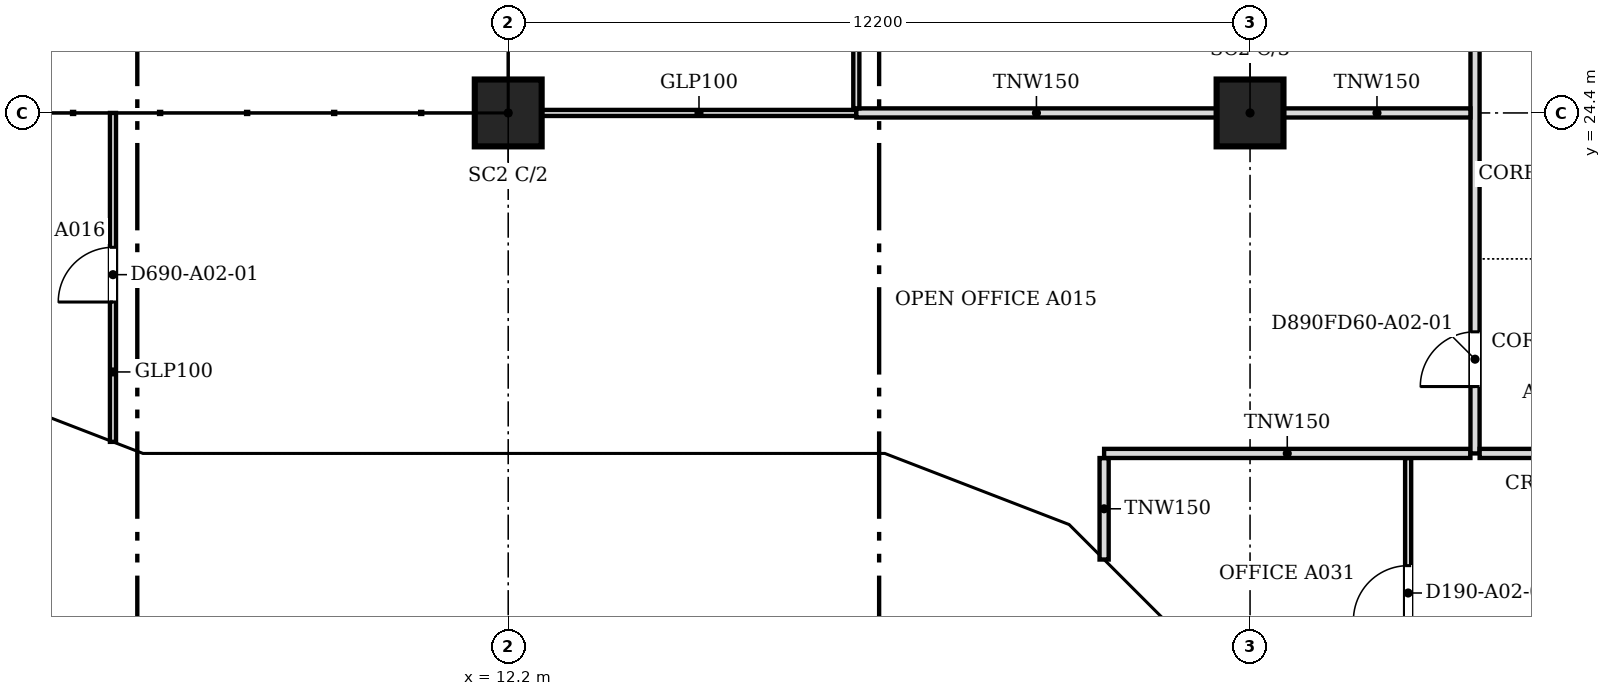
"""IFC4 building model, lengths in metres.
Left out: names, types, materials, properties, quantities, classifications, styles, units other than length and angle.
Written with IfcOpenShell. Run it as: python <this file> out.ifc"""

import sys

from ifc_helpers import new_model, si_unit, direction, frame, frame_2d, origin, origin_2d, place, context, subcontext, project, spatial, polyline, rectangle, outline, extrude, faceted_brep, source, transform, mapped, element, fill, save


model = new_model("IFC4")
c1 = context("Model", 3, precision=1e-05, world=origin(), true_north=direction((0.0, 1.0)))
c2 = subcontext(c1, "Body", "Model", "MODEL_VIEW")
j1 = project(units=[si_unit("LENGTHUNIT", "METRE"), si_unit("PLANEANGLEUNIT", "RADIAN")], contexts=[c1])
p1 = place(None, origin())
s1 = spatial("IfcSite", under=j1, at=p1, CompositionType="ELEMENT")
p2 = place(p1, origin())
s2 = spatial("IfcBuilding", under=s1, at=p2, CompositionType="ELEMENT")
p3 = place(p2, frame((0.0, 0.0, 33.4)))
s3 = spatial("IfcBuildingStorey", under=s2, at=p3, CompositionType="ELEMENT", Elevation=33.4)
for number, where, z_axis, x_axis in (
    (1, (12.2, 24.4, 0.0), (0.0, 0.0, 1.0), (1.0, 0.0, 0.0)),
    (2, (24.4, 24.4, 0.0), (0.0, 0.0, 1.0), (1.0, 0.0, 0.0)),
):
    element("IfcColumn", number, at=place(p3, frame(where, z_axis=z_axis, x_axis=x_axis)), inside=s3, PredefinedType="COLUMN", context=c2, shape_type="SweptSolid", body=[
        extrude(rectangle(XDim=1.1, YDim=1.1, at=origin_2d()), origin(), (0.0, 0.0, 1.0), 3.6),
    ])
m1 = source(origin(), c2, "Body", "Brep", [
    faceted_brep([(2.95, -0.25, 0.0), (2.997, -0.25, 0.059), (2.997, -0.25, 7.541), (2.95, -0.25, 7.6), (0.0, -0.25, 3.8), (0.053, 0.25, 3.868), (2.904, 0.25, 7.54), (2.904, 0.25, 0.06), (0.053, 0.25, 3.732), (2.95, 0.0, 0.0), (2.95, 0.0, 7.6), (0.0, 0.0, 3.8)], [[[0, 1, 2, 3, 4]], [[5, 6, 7, 8]], [[1, 0, 9]], [[10, 3, 2]], [[6, 5, 11, 4, 3, 10]], [[8, 7, 9, 0, 4, 11]], [[8, 11, 5]], [[1, 9, 7, 6, 10, 2]]]),
])
p4 = place(p3, frame((3.394, 19.612, -3.8), z_axis=(0.0, 0.0, 1.0), x_axis=(0.932990326376, -0.359901446078, 0.0)))
e3 = element("IfcWall", 3, at=p4, inside=s3, PredefinedType="SOLIDWALL", context=c2, shape_type="MappedRepresentation", body=[
    mapped(m1, transform((0.0, 0.0, 0.0), scale=1.0)),
])
m2 = source(origin(), c2, "Body", "SweptSolid", [
    extrude(outline(polyline([(2.75, 6.935), (0.316, 3.8), (2.75, 0.665), (2.75, 6.935)])), frame((0.0, 0.26, 0.0), z_axis=(0.0, -1.0, 0.0), x_axis=(1.0, 0.0, 0.0)), (0.0, 0.0, 1.0), 0.52),
])
p5 = place(p4, origin())
e4 = element("IfcOpeningElement", 4, at=p5, cuts=e3, PredefinedType="OPENING", context=c2, shape_type="MappedRepresentation", body=[
    mapped(m2, transform((0.0, 0.0, 0.0), scale=1.0)),
])
m3 = source(origin(), c2, "Body", "Brep", [
    faceted_brep([(0.047, -0.25, 0.0), (3.05, -0.25, 3.8), (0.047, -0.25, 7.6), (0.0, -0.25, 7.54), (0.0, -0.25, 0.06), (0.093, 0.25, 7.541), (3.05, 0.25, 3.8), (0.093, 0.25, 0.059), (0.047, 0.0, 0.0), (0.047, 0.0, 7.6)], [[[0, 1, 2, 3, 4]], [[5, 6, 7]], [[7, 6, 1, 0, 8]], [[6, 5, 9, 2, 1]], [[3, 2, 9]], [[8, 0, 4]], [[7, 8, 4, 3, 9, 5]]]),
])
p6 = place(p3, frame((6.1, 18.55, -3.8), z_axis=(0.0, 0.0, 1.0), x_axis=(1.0, 0.0, 0.0)))
e5 = element("IfcWall", 5, at=p6, inside=s3, PredefinedType="SOLIDWALL", context=c2, shape_type="MappedRepresentation", body=[
    mapped(m3, transform((0.0, 0.0, 0.0), scale=1.0)),
])
m4 = source(origin(), c2, "Body", "SweptSolid", [
    extrude(outline(polyline([(0.247, 0.656), (2.731, 3.8), (0.247, 6.944), (0.247, 0.656)])), frame((0.0, 0.26, 0.0), z_axis=(0.0, -1.0, 0.0), x_axis=(1.0, 0.0, 0.0)), (0.0, 0.0, 1.0), 0.52),
])
p7 = place(p6, origin())
e6 = element("IfcOpeningElement", 6, at=p7, cuts=e5, PredefinedType="OPENING", context=c2, shape_type="MappedRepresentation", body=[
    mapped(m4, transform((0.0, 0.0, 0.0), scale=1.0)),
])
m5 = source(origin(), c2, "Body", "SweptSolid", [
    extrude(outline(polyline([(3.05, 0.0), (6.1, 3.8), (3.05, 7.6), (0.0, 3.8), (3.05, 0.0)])), frame((0.0, 0.25, 0.0), z_axis=(0.0, -1.0, 0.0), x_axis=(1.0, 0.0, 0.0)), (0.0, 0.0, 1.0), 0.5),
])
p8 = place(p3, frame((9.15, 18.55, -3.8), z_axis=(0.0, 0.0, 1.0), x_axis=(1.0, 0.0, 0.0)))
e7 = element("IfcWall", 7, at=p8, inside=s3, PredefinedType="SOLIDWALL", context=c2, shape_type="MappedRepresentation", body=[
    mapped(m5, transform((0.0, 0.0, 0.0), scale=1.0)),
])
m6 = source(origin(), c2, "Body", "SweptSolid", [
    extrude(outline(polyline([(3.05, 0.399), (5.78, 3.8), (3.05, 7.2), (0.321, 3.8), (3.05, 0.399)])), frame((0.0, 0.26, 0.0), z_axis=(0.0, -1.0, 0.0), x_axis=(1.0, 0.0, 0.0)), (0.0, 0.0, 1.0), 0.52),
])
p9 = place(p8, origin())
e8 = element("IfcOpeningElement", 8, at=p9, cuts=e7, PredefinedType="OPENING", context=c2, shape_type="MappedRepresentation", body=[
    mapped(m6, transform((0.0, 0.0, 0.0), scale=1.0)),
])
m7 = source(origin(), c2, "Body", "Brep", [
    faceted_brep([(3.05, -0.25, 7.543), (0.0, -0.25, 3.8), (3.05, -0.25, 0.057), (0.0, 0.25, 3.8), (3.096, 0.25, 7.6), (3.143, 0.25, 7.543), (3.143, 0.25, 0.056), (3.096, 0.25, 0.0), (3.096, -0.0, 0.0), (3.096, -0.0, 7.6)], [[[0, 1, 2]], [[3, 4, 5, 6, 7]], [[7, 6, 8]], [[5, 4, 9]], [[4, 3, 1, 0, 9]], [[3, 7, 8, 2, 1]], [[2, 8, 6, 5, 9, 0]]]),
])
p10 = place(p3, frame((15.25, 18.55, -3.8), z_axis=(0.0, 0.0, 1.0), x_axis=(1.0, 0.0, 0.0)))
e9 = element("IfcWall", 9, at=p10, inside=s3, PredefinedType="SOLIDWALL", context=c2, shape_type="MappedRepresentation", body=[
    mapped(m7, transform((0.0, 0.0, 0.0), scale=1.0)),
])
m8 = source(origin(), c2, "Body", "SweptSolid", [
    extrude(outline(polyline([(2.896, 6.959), (0.323, 3.8), (2.896, 0.641), (2.896, 6.959)])), frame((0.0, 0.26, 0.0), z_axis=(0.0, -1.0, 0.0), x_axis=(1.0, 0.0, 0.0)), (0.0, 0.0, 1.0), 0.52),
])
p11 = place(p10, origin())
e10 = element("IfcOpeningElement", 10, at=p11, cuts=e9, PredefinedType="OPENING", context=c2, shape_type="MappedRepresentation", body=[
    mapped(m8, transform((0.0, 0.0, 0.0), scale=1.0)),
])
m9 = source(origin(), c2, "Body", "Brep", [
    faceted_brep([(0.093, -0.25, 0.056), (3.143, -0.25, 3.736), (3.143, -0.25, 3.864), (0.093, -0.25, 7.544), (0.0, 0.25, 7.543), (0.047, 0.25, 7.6), (3.196, 0.25, 3.8), (0.047, 0.25, 0.0), (0.0, 0.25, 0.057), (3.196, -0.0, 3.8), (0.047, 0.0, 0.0), (0.047, 0.0, 7.6)], [[[0, 1, 2, 3]], [[4, 5, 6, 7, 8]], [[7, 6, 9, 1, 0, 10]], [[6, 5, 11, 3, 2, 9]], [[5, 4, 11]], [[8, 7, 10]], [[8, 10, 0, 3, 11, 4]], [[1, 9, 2]]]),
])
p12 = place(p3, frame((18.303, 18.567, -3.8), z_axis=(0.0, 0.0, 1.0), x_axis=(0.932978940178, -0.359930961693, 0.0)))
e11 = element("IfcWall", 11, at=p12, inside=s3, PredefinedType="SOLIDWALL", context=c2, shape_type="MappedRepresentation", body=[
    mapped(m9, transform((0.0, 0.0, 0.0), scale=1.0)),
])
m10 = source(origin(), c2, "Body", "SweptSolid", [
    extrude(outline(polyline([(0.247, 0.633), (2.871, 3.8), (0.247, 6.967), (0.247, 0.633)])), frame((0.0, 0.26, 0.0), z_axis=(0.0, -1.0, 0.0), x_axis=(1.0, 0.0, 0.0)), (0.0, 0.0, 1.0), 0.52),
])
p13 = place(p12, origin())
e12 = element("IfcOpeningElement", 12, at=p13, cuts=e11, PredefinedType="OPENING", context=c2, shape_type="MappedRepresentation", body=[
    mapped(m10, transform((0.0, 0.0, 0.0), scale=1.0)),
])
m11 = source(origin(), c2, "Body", "Brep", [
    faceted_brep([(3.103, -0.25, 7.536), (0.053, -0.25, 3.864), (0.053, -0.25, 3.736), (3.103, -0.25, 0.064), (0.0, 0.25, 3.8), (3.156, 0.25, 7.6), (3.209, 0.25, 7.536), (3.209, 0.25, 0.064), (3.156, 0.25, 0.0), (3.156, -0.0, 0.0), (3.156, -0.0, 7.6), (0.0, 0.0, 3.8)], [[[0, 1, 2, 3]], [[4, 5, 6, 7, 8]], [[8, 7, 9]], [[6, 5, 10]], [[5, 4, 11, 1, 0, 10]], [[4, 8, 9, 3, 2, 11]], [[11, 2, 1]], [[3, 9, 7, 6, 10, 0]]]),
])
p14 = place(p3, frame((21.285, 17.417, -3.8), z_axis=(0.0, 0.0, 1.0), x_axis=(0.707106781187, -0.707106781187, 0.0)))
e13 = element("IfcWall", 13, at=p14, inside=s3, PredefinedType="SOLIDWALL", context=c2, shape_type="MappedRepresentation", body=[
    mapped(m11, transform((0.0, 0.0, 0.0), scale=1.0)),
])
m12 = source(origin(), c2, "Body", "SweptSolid", [
    extrude(outline(polyline([(2.956, 6.968), (0.325, 3.8), (2.956, 0.632), (2.956, 6.968)])), frame((0.0, 0.26, 0.0), z_axis=(0.0, -1.0, 0.0), x_axis=(1.0, 0.0, 0.0)), (0.0, 0.0, 1.0), 0.52),
])
p15 = place(p14, origin())
e14 = element("IfcOpeningElement", 14, at=p15, cuts=e13, PredefinedType="OPENING", context=c2, shape_type="MappedRepresentation", body=[
    mapped(m12, transform((0.0, 0.0, 0.0), scale=1.0)),
])
p16 = place(p2, frame((0.0, 0.0, 37.2)))
s4 = spatial("IfcBuildingStorey", under=s2, at=p16, CompositionType="ELEMENT", Elevation=37.2)
m13 = source(origin(), c2, "Body", "Brep", [
    faceted_brep([(0.053, -0.25, 0.0), (3.003, -0.25, 3.8), (0.053, -0.25, 7.6), (0.0, -0.25, 7.532), (0.0, -0.25, 0.068), (0.106, 0.25, 7.532), (2.957, 0.25, 3.86), (2.957, 0.25, 3.74), (0.106, 0.25, 0.068), (3.003, 0.0, 3.8), (0.053, 0.0, 0.0), (0.053, 0.0, 7.6)], [[[0, 1, 2, 3, 4]], [[5, 6, 7, 8]], [[8, 7, 9, 1, 0, 10]], [[6, 5, 11, 2, 1, 9]], [[3, 2, 11]], [[10, 0, 4]], [[8, 10, 4, 3, 11, 5]], [[9, 7, 6]]]),
])
p17 = place(p16, frame((3.344, 19.631, -3.8), z_axis=(0.0, 0.0, 1.0), x_axis=(0.933007896601, -0.359855894603, 0.0)))
e15 = element("IfcWall", 15, at=p17, inside=s4, PredefinedType="SOLIDWALL", context=c2, shape_type="MappedRepresentation", body=[
    mapped(m13, transform((0.0, 0.0, 0.0), scale=1.0)),
])
m14 = source(origin(), c2, "Body", "SweptSolid", [
    extrude(outline(polyline([(0.253, 0.665), (2.687, 3.8), (0.253, 6.935), (0.253, 0.665)])), frame((0.0, 0.26, 0.0), z_axis=(0.0, -1.0, 0.0), x_axis=(1.0, 0.0, 0.0)), (0.0, 0.0, 1.0), 0.52),
])
p18 = place(p17, origin())
e16 = element("IfcOpeningElement", 16, at=p18, cuts=e15, PredefinedType="OPENING", context=c2, shape_type="MappedRepresentation", body=[
    mapped(m14, transform((0.0, 0.0, 0.0), scale=1.0)),
])
m15 = source(origin(), c2, "Body", "Brep", [
    faceted_brep([(3.003, -0.25, 0.0), (6.053, -0.25, 3.8), (3.003, -0.25, 7.6), (0.0, -0.25, 3.8), (0.047, 0.25, 3.859), (3.003, 0.25, 7.6), (6.053, 0.25, 3.8), (3.003, 0.25, 0.0), (0.047, 0.25, 3.741), (0.0, 0.0, 3.8)], [[[0, 1, 2, 3]], [[4, 5, 6, 7, 8]], [[7, 6, 1, 0]], [[6, 5, 2, 1]], [[5, 4, 9, 3, 2]], [[8, 7, 0, 3, 9]], [[8, 9, 4]]]),
])
p19 = place(p16, frame((6.146, 18.55, -3.8), z_axis=(0.0, 0.0, 1.0), x_axis=(1.0, 0.0, 0.0)))
e17 = element("IfcWall", 17, at=p19, inside=s4, PredefinedType="SOLIDWALL", context=c2, shape_type="MappedRepresentation", body=[
    mapped(m15, transform((0.0, 0.0, 0.0), scale=1.0)),
])
m16 = source(origin(), c2, "Body", "SweptSolid", [
    extrude(outline(polyline([(3.005, 0.401), (5.733, 3.8), (3.005, 7.199), (0.319, 3.8), (3.005, 0.401)])), frame((0.0, 0.26, 0.0), z_axis=(0.0, -1.0, 0.0), x_axis=(1.0, 0.0, 0.0)), (0.0, 0.0, 1.0), 0.52),
])
p20 = place(p19, origin())
e18 = element("IfcOpeningElement", 18, at=p20, cuts=e17, PredefinedType="OPENING", context=c2, shape_type="MappedRepresentation", body=[
    mapped(m16, transform((0.0, 0.0, 0.0), scale=1.0)),
])
m17 = source(origin(), c2, "Body", "Brep", [
    faceted_brep([(3.05, -0.25, 0.0), (6.1, -0.25, 3.743), (6.1, -0.25, 3.857), (3.05, -0.25, 7.6), (0.0, -0.25, 3.8), (0.0, 0.25, 3.8), (3.05, 0.25, 7.6), (6.146, 0.25, 3.8), (3.05, 0.25, 0.0), (6.146, -0.0, 3.8)], [[[0, 1, 2, 3, 4]], [[5, 6, 7, 8]], [[8, 7, 9, 1, 0]], [[7, 6, 3, 2, 9]], [[6, 5, 4, 3]], [[5, 8, 0, 4]], [[1, 9, 2]]]),
])
p21 = place(p16, frame((12.2, 18.55, -3.8), z_axis=(0.0, 0.0, 1.0), x_axis=(1.0, 0.0, 0.0)))
e19 = element("IfcWall", 19, at=p21, inside=s4, PredefinedType="SOLIDWALL", context=c2, shape_type="MappedRepresentation", body=[
    mapped(m17, transform((0.0, 0.0, 0.0), scale=1.0)),
])
m18 = source(origin(), c2, "Body", "SweptSolid", [
    extrude(outline(polyline([(3.052, 0.398), (5.824, 3.8), (3.052, 7.203), (0.321, 3.8), (3.052, 0.398)])), frame((0.0, 0.26, 0.0), z_axis=(0.0, -1.0, 0.0), x_axis=(1.0, 0.0, 0.0)), (0.0, 0.0, 1.0), 0.52),
])
p22 = place(p21, origin())
e20 = element("IfcOpeningElement", 20, at=p22, cuts=e19, PredefinedType="OPENING", context=c2, shape_type="MappedRepresentation", body=[
    mapped(m18, transform((0.0, 0.0, 0.0), scale=1.0)),
])
m19 = source(origin(), c2, "Body", "Brep", [
    faceted_brep([(3.096, -0.25, 7.536), (0.047, -0.25, 3.856), (0.047, -0.25, 3.744), (3.096, -0.25, 0.064), (0.0, 0.25, 3.8), (3.149, 0.25, 7.6), (3.202, 0.25, 7.536), (3.202, 0.25, 0.064), (3.149, 0.25, 0.0), (3.149, -0.0, 0.0), (3.149, -0.0, 7.6), (0.0, 0.0, 3.8)], [[[0, 1, 2, 3]], [[4, 5, 6, 7, 8]], [[8, 7, 9]], [[6, 5, 10]], [[5, 4, 11, 1, 0, 10]], [[4, 8, 9, 3, 2, 11]], [[11, 2, 1]], [[3, 9, 7, 6, 10, 0]]]),
])
p23 = place(p16, frame((18.346, 18.55, -3.8), z_axis=(0.0, 0.0, 1.0), x_axis=(0.932985567668, -0.359913782069, 0.0)))
e21 = element("IfcWall", 21, at=p23, inside=s4, PredefinedType="SOLIDWALL", context=c2, shape_type="MappedRepresentation", body=[
    mapped(m19, transform((0.0, 0.0, 0.0), scale=1.0)),
])
m20 = source(origin(), c2, "Body", "SweptSolid", [
    extrude(outline(polyline([(2.949, 6.967), (0.325, 3.8), (2.949, 0.633), (2.949, 6.967)])), frame((0.0, 0.26, 0.0), z_axis=(0.0, -1.0, 0.0), x_axis=(1.0, 0.0, 0.0)), (0.0, 0.0, 1.0), 0.52),
])
p24 = place(p23, origin())
e22 = element("IfcOpeningElement", 22, at=p24, cuts=e21, PredefinedType="OPENING", context=c2, shape_type="MappedRepresentation", body=[
    mapped(m20, transform((0.0, 0.0, 0.0), scale=1.0)),
])
m21 = source(origin(), c2, "Body", "Brep", [
    faceted_brep([(0.106, -0.25, 0.064), (3.156, -0.25, 3.736), (3.156, -0.25, 3.864), (0.106, -0.25, 7.536), (0.0, 0.25, 7.536), (0.053, 0.25, 7.6), (3.209, 0.25, 3.8), (0.053, 0.25, 0.0), (0.0, 0.25, 0.064), (3.209, -0.0, 3.8), (0.053, 0.0, 0.0), (0.053, 0.0, 7.6)], [[[0, 1, 2, 3]], [[4, 5, 6, 7, 8]], [[7, 6, 9, 1, 0, 10]], [[6, 5, 11, 3, 2, 9]], [[5, 4, 11]], [[8, 7, 10]], [[8, 10, 0, 3, 11, 4]], [[1, 9, 2]]]),
])
p25 = place(p16, frame((21.248, 17.454, -3.8), z_axis=(0.0, 0.0, 1.0), x_axis=(0.707106781187, -0.707106781187, 0.0)))
e23 = element("IfcWall", 23, at=p25, inside=s4, PredefinedType="SOLIDWALL", context=c2, shape_type="MappedRepresentation", body=[
    mapped(m21, transform((0.0, 0.0, 0.0), scale=1.0)),
])
m22 = source(origin(), c2, "Body", "SweptSolid", [
    extrude(outline(polyline([(0.253, 0.632), (2.884, 3.8), (0.253, 6.968), (0.253, 0.632)])), frame((0.0, 0.26, 0.0), z_axis=(0.0, -1.0, 0.0), x_axis=(1.0, 0.0, 0.0)), (0.0, 0.0, 1.0), 0.52),
])
p26 = place(p25, origin())
e24 = element("IfcOpeningElement", 24, at=p26, cuts=e23, PredefinedType="OPENING", context=c2, shape_type="MappedRepresentation", body=[
    mapped(m22, transform((0.0, 0.0, 0.0), scale=1.0)),
])
p27 = place(p3, frame((27.0, 10.276, 0.0), z_axis=(0.0, 0.0, 1.0), x_axis=(0.0, 1.0, 0.0)))
e25 = element("IfcWall", 25, at=p27, inside=s3, PredefinedType="PARTITIONING", context=c2, shape_type="SweptSolid", body=[
    extrude(rectangle(XDim=8.448, YDim=0.1, at=frame_2d((4.224, 0.0))), origin(), (0.0, 0.0, 1.0), 3.067),
])
m23 = source(origin(), c2, "Body", "SweptSolid", [
    extrude(rectangle(XDim=0.9, YDim=2.1, at=frame_2d((0.45, 1.05))), frame((0.0, 0.06, 0.0), z_axis=(0.0, -1.0, 0.0), x_axis=(1.0, 0.0, 0.0)), (0.0, 0.0, 1.0), 0.12),
])
p28 = place(p27, frame((1.6, 0.0, 0.0)))
e26 = element("IfcOpeningElement", 26, at=p28, cuts=e25, PredefinedType="OPENING", context=c2, shape_type="MappedRepresentation", body=[
    mapped(m23, transform((0.0, 0.0, 0.0), scale=1.0)),
])
p29 = place(p27, frame((5.779, 0.0, 0.0)))
e27 = element("IfcOpeningElement", 27, at=p29, cuts=e25, PredefinedType="OPENING", context=c2, shape_type="MappedRepresentation", body=[
    mapped(m23, transform((0.0, 0.0, 0.0), scale=1.0)),
])
p30 = place(p3, frame((22.0, 17.055, 0.0), z_axis=(0.0, 0.0, 1.0), x_axis=(0.0, 1.0, 0.0)))
e28 = element("IfcWall", 28, at=p30, inside=s3, PredefinedType="PARTITIONING", context=c2, shape_type="SweptSolid", body=[
    extrude(rectangle(XDim=1.669, YDim=0.15, at=frame_2d((0.834, 0.0))), origin(), (0.0, 0.0, 1.0), 3.067),
])
p31 = place(p3, frame((22.0, 18.8, 0.0), z_axis=(0.0, 0.0, 1.0), x_axis=(1.0, 0.0, 0.0)))
e29 = element("IfcWall", 29, at=p31, inside=s3, PredefinedType="PARTITIONING", context=c2, shape_type="SweptSolid", body=[
    extrude(rectangle(XDim=6.024, YDim=0.15, at=frame_2d((3.012, 0.0))), origin(), (0.0, 0.0, 1.0), 3.067),
])
p32 = place(p3, frame((28.1, 18.8, 0.0), z_axis=(0.0, 0.0, 1.0), x_axis=(0.0, 1.0, 0.0)))
e30 = element("IfcWall", 30, at=p32, inside=s3, PredefinedType="PARTITIONING", context=c2, shape_type="SweptSolid", body=[
    extrude(rectangle(XDim=26.5, YDim=0.15, at=frame_2d((13.25, 0.0))), origin(), (0.0, 0.0, 1.0), 3.067),
])
m24 = source(origin(), c2, "Body", "SweptSolid", [
    extrude(rectangle(XDim=0.9, YDim=2.1, at=frame_2d((0.45, 1.05))), frame((0.0, 0.085, 0.0), z_axis=(0.0, -1.0, 0.0), x_axis=(1.0, 0.0, 0.0)), (0.0, 0.0, 1.0), 0.17),
])
p33 = place(p32, frame((1.1, 0.0, 0.0)))
e31 = element("IfcOpeningElement", 31, at=p33, cuts=e30, PredefinedType="OPENING", context=c2, shape_type="MappedRepresentation", body=[
    mapped(m24, transform((0.0, 0.0, 0.0), scale=1.0)),
])
m25 = source(origin(), c2, "Body", "SweptSolid", [
    extrude(rectangle(XDim=1.0, YDim=2.1, at=frame_2d((0.5, 1.05))), frame((0.0, 0.085, 0.0), z_axis=(0.0, -1.0, 0.0), x_axis=(1.0, 0.0, 0.0)), (0.0, 0.0, 1.0), 0.17),
])
p34 = place(p32, frame((23.151, 0.0, 0.0)))
e32 = element("IfcOpeningElement", 32, at=p34, cuts=e30, PredefinedType="OPENING", context=c2, shape_type="MappedRepresentation", body=[
    mapped(m25, transform((0.0, 0.0, 0.0), scale=1.0)),
])
p35 = place(p32, frame((8.2, 0.0, 0.0)))
e33 = element("IfcOpeningElement", 33, at=p35, cuts=e30, PredefinedType="OPENING", context=c2, shape_type="MappedRepresentation", body=[
    mapped(m24, transform((0.0, 0.0, 0.0), scale=1.0)),
])
p36 = place(p32, frame((15.8, 0.0, 0.0)))
e34 = element("IfcOpeningElement", 34, at=p36, cuts=e30, PredefinedType="OPENING", context=c2, shape_type="MappedRepresentation", body=[
    mapped(m25, transform((0.0, 0.0, 0.0), scale=1.0)),
])
p37 = place(p3, frame((28.176, 18.8, 0.0), z_axis=(0.0, 0.0, 1.0), x_axis=(1.0, 0.0, 0.0)))
e35 = element("IfcWall", 35, at=p37, inside=s3, PredefinedType="PARTITIONING", context=c2, shape_type="SweptSolid", body=[
    extrude(rectangle(XDim=2.248, YDim=0.15, at=frame_2d((1.124, 0.0))), origin(), (0.0, 0.0, 1.0), 3.067),
])
p38 = place(p3, frame((5.7, 18.99, 0.0), z_axis=(0.0, 0.0, 1.0), x_axis=(0.0, 1.0, 0.0)))
e36 = element("IfcWall", 36, at=p38, inside=s3, PredefinedType="PARTITIONING", context=c2, shape_type="SweptSolid", body=[
    extrude(rectangle(XDim=5.41, YDim=0.1, at=frame_2d((2.705, 0.0))), origin(), (0.0, 0.0, 1.0), 3.067),
])
p39 = place(p38, frame((2.3, 0.0, 0.0)))
e37 = element("IfcOpeningElement", 37, at=p39, cuts=e36, PredefinedType="OPENING", context=c2, shape_type="MappedRepresentation", body=[
    mapped(m23, transform((0.0, 0.0, 0.0), scale=1.0)),
])
p40 = place(p3, frame((12.751, 24.4, 0.0), z_axis=(0.0, 0.0, 1.0), x_axis=(1.0, 0.0, 0.0)))
e38 = element("IfcWall", 38, at=p40, inside=s3, PredefinedType="PARTITIONING", context=c2, shape_type="SweptSolid", body=[
    extrude(rectangle(XDim=5.173, YDim=0.1, at=frame_2d((2.586, 0.0))), origin(), (0.0, 0.0, 1.0), 3.067),
])
p41 = place(p3, frame((17.925, 24.4, 0.0), z_axis=(0.0, 0.0, 1.0), x_axis=(1.0, 0.0, 0.0)))
e39 = element("IfcWall", 39, at=p41, inside=s3, PredefinedType="PARTITIONING", context=c2, shape_type="SweptSolid", body=[
    extrude(rectangle(XDim=5.924, YDim=0.15, at=frame_2d((2.962, 0.0))), origin(), (0.0, 0.0, 1.0), 3.067),
])
p42 = place(p3, frame((24.951, 24.4, 0.0), z_axis=(0.0, 0.0, 1.0), x_axis=(1.0, 0.0, 0.0)))
e40 = element("IfcWall", 40, at=p42, inside=s3, PredefinedType="PARTITIONING", context=c2, shape_type="SweptSolid", body=[
    extrude(rectangle(XDim=3.073, YDim=0.15, at=frame_2d((1.537, 0.0))), origin(), (0.0, 0.0, 1.0), 3.067),
])
p43 = place(p3, frame((17.925, 24.476, 0.0), z_axis=(0.0, 0.0, 1.0), x_axis=(0.0, 1.0, 0.0)))
e41 = element("IfcWall", 41, at=p43, inside=s3, PredefinedType="PARTITIONING", context=c2, shape_type="SweptSolid", body=[
    extrude(rectangle(XDim=5.948, YDim=0.1, at=frame_2d((2.974, 0.0))), origin(), (0.0, 0.0, 1.0), 3.067),
])
p44 = place(p43, frame((2.5, 0.0, 0.0)))
e42 = element("IfcOpeningElement", 42, at=p44, cuts=e41, PredefinedType="OPENING", context=c2, shape_type="MappedRepresentation", body=[
    mapped(m23, transform((0.0, 0.0, 0.0), scale=1.0)),
])
m26 = source(origin(), c2, "Body", "SweptSolid", [
    extrude(rectangle(XDim=0.9, YDim=2.1, at=frame_2d((0.45, 1.05))), frame((0.0, 0.025, 0.0), z_axis=(0.0, -1.0, 0.0), x_axis=(1.0, 0.0, 0.0)), (0.0, 0.0, 1.0), 0.05),
])
p45 = place(p33, origin())
e43 = element("IfcDoor", 43, at=p45, inside=s3, OperationType="SINGLE_SWING_LEFT", PredefinedType="DOOR", context=c2, shape_type="MappedRepresentation", body=[
    mapped(m26, transform((0.0, 0.0, 0.0), scale=1.0)),
])
fill(e31, e43)
p46 = place(p29, origin())
e44 = element("IfcDoor", 44, at=p46, inside=s3, OperationType="SINGLE_SWING_LEFT", PredefinedType="DOOR", context=c2, shape_type="MappedRepresentation", body=[
    mapped(m26, transform((0.0, 0.0, 0.0), scale=1.0)),
])
fill(e27, e44)
p47 = place(p39, origin())
e45 = element("IfcDoor", 45, at=p47, inside=s3, OperationType="SINGLE_SWING_LEFT", PredefinedType="DOOR", context=c2, shape_type="MappedRepresentation", body=[
    mapped(m26, transform((0.0, 0.0, 0.0), scale=1.0)),
])
fill(e37, e45)
save(model, sys.argv[1])
